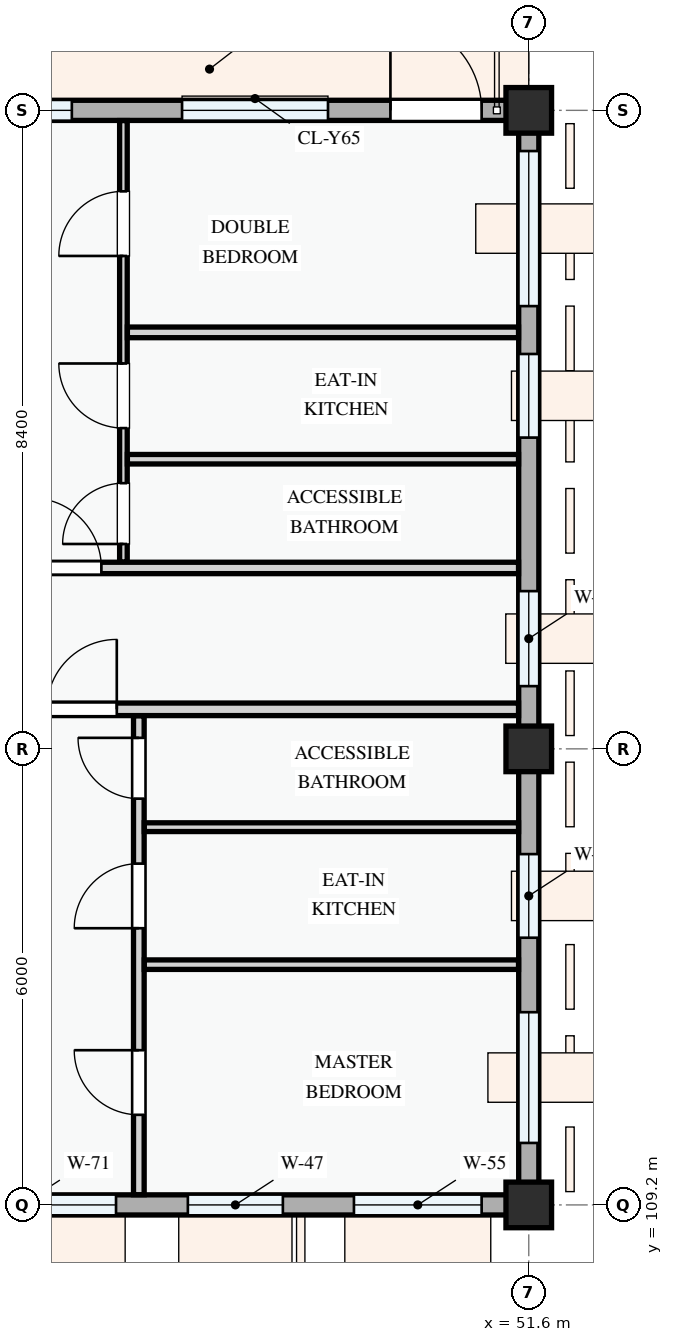
"""IFC4 building model, lengths in metres.
Left out: names, types, materials, properties, quantities, classifications, styles, units other than length and angle.
Written with IfcOpenShell. Run it as: python <this file> out.ifc"""

import sys

from ifc_helpers import new_model, si_unit, direction, frame, frame_2d, origin, origin_2d, place, context, subcontext, project, spatial, rectangle, extrude, element, fill, save


model = new_model("IFC4")
c1 = context("Model", 3, precision=1e-05, world=origin(), true_north=direction((0.0, 1.0)))
c2 = subcontext(c1, "Body", "Model", "MODEL_VIEW")
j1 = project(units=[si_unit("LENGTHUNIT", "METRE"), si_unit("PLANEANGLEUNIT", "RADIAN")], contexts=[c1])
p1 = place(None, origin())
s1 = spatial("IfcSite", under=j1, at=p1, CompositionType="ELEMENT")
p2 = place(p1, origin())
s2 = spatial("IfcBuilding", under=s1, at=p2, CompositionType="ELEMENT")
p3 = place(p2, frame((0.0, 0.0, 34.5)))
s3 = spatial("IfcBuildingStorey", under=s2, at=p3, CompositionType="ELEMENT", Elevation=34.5)
for number, where, z_axis, x_axis in (
    (1, (51.6, 109.2, 0.0), (0.0, 0.0, 1.0), (1.0, 0.0, 0.0)),
    (2, (51.6, 115.2, 0.0), (0.0, 0.0, 1.0), (1.0, 0.0, 0.0)),
    (3, (51.6, 123.6, 0.0), (0.0, 0.0, 1.0), (1.0, 0.0, 0.0)),
):
    element("IfcColumn", number, at=place(p3, frame(where, z_axis=z_axis, x_axis=x_axis)), inside=s3, PredefinedType="COLUMN", context=c2, shape_type="SweptSolid", body=[
        extrude(rectangle(XDim=0.6, YDim=0.6, at=origin_2d()), origin(), (0.0, 0.0, 1.0), 3.3),
    ])
p4 = place(p3, frame((43.2, 109.2, 0.0), z_axis=(0.0, 0.0, 1.0), x_axis=(1.0, 0.0, 0.0)))
e4 = element("IfcWall", 4, at=p4, inside=s3, PredefinedType="STANDARD", context=c2, shape_type="SweptSolid", body=[
    extrude(rectangle(XDim=8.4, YDim=0.265, at=frame_2d((4.2, 0.0))), origin(), (0.0, 0.0, 1.0), 2.375),
])
p5 = place(p4, frame((0.49, 0.0, 0.78)))
e5 = element("IfcOpeningElement", 5, at=p5, cuts=e4, PredefinedType="OPENING", context=c2, shape_type="SweptSolid", body=[
    extrude(rectangle(XDim=2.48, YDim=1.46, at=frame_2d((1.24, 0.73))), frame((0.0, 0.143, 0.0), z_axis=(0.0, -1.0, 0.0), x_axis=(1.0, 0.0, 0.0)), (0.0, 0.0, 1.0), 0.285),
])
p6 = place(p4, frame((3.915, 0.0, 0.78)))
e6 = element("IfcOpeningElement", 6, at=p6, cuts=e4, PredefinedType="OPENING", context=c2, shape_type="SweptSolid", body=[
    extrude(rectangle(XDim=1.25, YDim=1.45, at=frame_2d((0.625, 0.725))), frame((0.0, 0.143, 0.0), z_axis=(0.0, -1.0, 0.0), x_axis=(1.0, 0.0, 0.0)), (0.0, 0.0, 1.0), 0.285),
])
p7 = place(p4, frame((6.1, 0.0, 0.78)))
e7 = element("IfcOpeningElement", 7, at=p7, cuts=e4, PredefinedType="OPENING", context=c2, shape_type="SweptSolid", body=[
    extrude(rectangle(XDim=1.68, YDim=1.46, at=frame_2d((0.84, 0.73))), frame((0.0, 0.143, 0.0), z_axis=(0.0, -1.0, 0.0), x_axis=(1.0, 0.0, 0.0)), (0.0, 0.0, 1.0), 0.285),
])
p8 = place(p3, frame((51.6, 109.2, 0.0), z_axis=(0.0, 0.0, 1.0), x_axis=(0.0, 1.0, 0.0)))
e8 = element("IfcWall", 8, at=p8, inside=s3, PredefinedType="STANDARD", context=c2, shape_type="SweptSolid", body=[
    extrude(rectangle(XDim=6.0, YDim=0.265, at=frame_2d((3.0, 0.0))), origin(), (0.0, 0.0, 1.0), 2.575),
])
p9 = place(p8, frame((0.815, 0.0, 0.78)))
e9 = element("IfcOpeningElement", 9, at=p9, cuts=e8, PredefinedType="OPENING", context=c2, shape_type="SweptSolid", body=[
    extrude(rectangle(XDim=1.72, YDim=1.52, at=frame_2d((0.86, 0.76))), frame((0.0, 0.143, 0.0), z_axis=(0.0, -1.0, 0.0), x_axis=(1.0, 0.0, 0.0)), (0.0, 0.0, 1.0), 0.285),
])
p10 = place(p8, frame((3.515, 0.0, 0.78)))
e10 = element("IfcOpeningElement", 10, at=p10, cuts=e8, PredefinedType="OPENING", context=c2, shape_type="SweptSolid", body=[
    extrude(rectangle(XDim=1.1, YDim=1.3, at=frame_2d((0.55, 0.65))), frame((0.0, 0.143, 0.0), z_axis=(0.0, -1.0, 0.0), x_axis=(1.0, 0.0, 0.0)), (0.0, 0.0, 1.0), 0.285),
])
p11 = place(p3, frame((51.6, 115.2, 0.0), z_axis=(0.0, 0.0, 1.0), x_axis=(0.0, 1.0, 0.0)))
e11 = element("IfcWall", 11, at=p11, inside=s3, PredefinedType="STANDARD", context=c2, shape_type="SweptSolid", body=[
    extrude(rectangle(XDim=8.4, YDim=0.265, at=frame_2d((4.2, 0.0))), origin(), (0.0, 0.0, 1.0), 2.425),
])
p12 = place(p11, frame((0.825, 0.0, 0.78)))
e12 = element("IfcOpeningElement", 12, at=p12, cuts=e11, PredefinedType="OPENING", context=c2, shape_type="SweptSolid", body=[
    extrude(rectangle(XDim=1.25, YDim=1.3, at=frame_2d((0.625, 0.65))), frame((0.0, 0.143, 0.0), z_axis=(0.0, -1.0, 0.0), x_axis=(1.0, 0.0, 0.0)), (0.0, 0.0, 1.0), 0.285),
])
p13 = place(p11, frame((4.095, 0.0, 0.78)))
e13 = element("IfcOpeningElement", 13, at=p13, cuts=e11, PredefinedType="OPENING", context=c2, shape_type="SweptSolid", body=[
    extrude(rectangle(XDim=1.1, YDim=1.3, at=frame_2d((0.55, 0.65))), frame((0.0, 0.143, 0.0), z_axis=(0.0, -1.0, 0.0), x_axis=(1.0, 0.0, 0.0)), (0.0, 0.0, 1.0), 0.285),
])
p14 = place(p11, frame((5.825, 0.0, 0.78)))
e14 = element("IfcOpeningElement", 14, at=p14, cuts=e11, PredefinedType="OPENING", context=c2, shape_type="SweptSolid", body=[
    extrude(rectangle(XDim=2.04, YDim=1.46, at=frame_2d((1.02, 0.73))), frame((0.0, 0.143, 0.0), z_axis=(0.0, -1.0, 0.0), x_axis=(1.0, 0.0, 0.0)), (0.0, 0.0, 1.0), 0.285),
])
p15 = place(p3, frame((51.6, 123.6, 0.0), z_axis=(0.0, 0.0, 1.0), x_axis=(-1.0, 0.0, 0.0)))
e15 = element("IfcWall", 15, at=p15, inside=s3, PredefinedType="STANDARD", context=c2, shape_type="SweptSolid", body=[
    extrude(rectangle(XDim=8.4, YDim=0.265, at=frame_2d((4.2, 0.0))), origin(), (0.0, 0.0, 1.0), 2.345),
])
p16 = place(p15, frame((0.62, 0.0, 0.0)))
e16 = element("IfcOpeningElement", 16, at=p16, cuts=e15, PredefinedType="OPENING", context=c2, shape_type="SweptSolid", body=[
    extrude(rectangle(XDim=1.2, YDim=2.15, at=frame_2d((0.6, 1.075))), frame((0.0, 0.143, 0.0), z_axis=(0.0, -1.0, 0.0), x_axis=(1.0, 0.0, 0.0)), (0.0, 0.0, 1.0), 0.285),
])
p17 = place(p15, frame((2.641, 0.0, 0.78)))
e17 = element("IfcOpeningElement", 17, at=p17, cuts=e15, PredefinedType="OPENING", context=c2, shape_type="SweptSolid", body=[
    extrude(rectangle(XDim=1.92, YDim=1.44, at=frame_2d((0.96, 0.72))), frame((0.0, 0.143, 0.0), z_axis=(0.0, -1.0, 0.0), x_axis=(1.0, 0.0, 0.0)), (0.0, 0.0, 1.0), 0.285),
])
p18 = place(p15, frame((6.011, 0.0, 0.78)))
e18 = element("IfcOpeningElement", 18, at=p18, cuts=e15, PredefinedType="OPENING", context=c2, shape_type="SweptSolid", body=[
    extrude(rectangle(XDim=1.52, YDim=1.42, at=frame_2d((0.76, 0.71))), frame((0.0, 0.143, 0.0), z_axis=(0.0, -1.0, 0.0), x_axis=(1.0, 0.0, 0.0)), (0.0, 0.0, 1.0), 0.285),
])
p19 = place(p3, frame((46.47, 109.334, 0.0), z_axis=(0.0, 0.0, 1.0), x_axis=(0.0, 1.0, 0.0)))
e19 = element("IfcWall", 19, at=p19, inside=s3, PredefinedType="PARTITIONING", context=c2, shape_type="SweptSolid", body=[
    extrude(rectangle(XDim=6.301, YDim=0.14, at=frame_2d((3.15, 0.0))), origin(), (0.0, 0.0, 1.0), 3.0),
])
p20 = place(p19, frame((1.051, 0.0, 0.0)))
e20 = element("IfcOpeningElement", 20, at=p20, cuts=e19, PredefinedType="OPENING", context=c2, shape_type="SweptSolid", body=[
    extrude(rectangle(XDim=0.85, YDim=2.1, at=frame_2d((0.425, 1.05))), frame((0.0, 0.08, 0.0), z_axis=(0.0, -1.0, 0.0), x_axis=(1.0, 0.0, 0.0)), (0.0, 0.0, 1.0), 0.16),
])
p21 = place(p19, frame((3.506, 0.0, 0.0)))
e21 = element("IfcOpeningElement", 21, at=p21, cuts=e19, PredefinedType="OPENING", context=c2, shape_type="SweptSolid", body=[
    extrude(rectangle(XDim=0.85, YDim=2.1, at=frame_2d((0.425, 1.05))), frame((0.0, 0.08, 0.0), z_axis=(0.0, -1.0, 0.0), x_axis=(1.0, 0.0, 0.0)), (0.0, 0.0, 1.0), 0.16),
])
p22 = place(p19, frame((5.21, 0.0, 0.0)))
e22 = element("IfcOpeningElement", 22, at=p22, cuts=e19, PredefinedType="OPENING", context=c2, shape_type="SweptSolid", body=[
    extrude(rectangle(XDim=0.8, YDim=2.1, at=frame_2d((0.4, 1.05))), frame((0.0, 0.08, 0.0), z_axis=(0.0, -1.0, 0.0), x_axis=(1.0, 0.0, 0.0)), (0.0, 0.0, 1.0), 0.16),
])
p23 = place(p3, frame((46.542, 112.361, 0.0), z_axis=(0.0, 0.0, 1.0), x_axis=(1.0, 0.0, 0.0)))
e23 = element("IfcWall", 23, at=p23, inside=s3, PredefinedType="PARTITIONING", context=c2, shape_type="SweptSolid", body=[
    extrude(rectangle(XDim=4.924, YDim=0.125, at=frame_2d((2.462, 0.0))), origin(), (0.0, 0.0, 1.0), 3.0),
])
p24 = place(p3, frame((46.542, 114.17, 0.0), z_axis=(0.0, 0.0, 1.0), x_axis=(1.0, 0.0, 0.0)))
e24 = element("IfcWall", 24, at=p24, inside=s3, PredefinedType="PARTITIONING", context=c2, shape_type="SweptSolid", body=[
    extrude(rectangle(XDim=4.924, YDim=0.115, at=frame_2d((2.462, 0.0))), origin(), (0.0, 0.0, 1.0), 3.0),
])
p25 = place(p3, frame((46.267, 117.657, 0.0), z_axis=(0.0, 0.0, 1.0), x_axis=(0.0, 1.0, 0.0)))
e25 = element("IfcWall", 25, at=p25, inside=s3, PredefinedType="PARTITIONING", context=c2, shape_type="SweptSolid", body=[
    extrude(rectangle(XDim=5.809, YDim=0.1, at=frame_2d((2.904, 0.0))), origin(), (0.0, 0.0, 1.0), 3.0),
])
p26 = place(p25, frame((0.238, 0.0, 0.0)))
e26 = element("IfcOpeningElement", 26, at=p26, cuts=e25, PredefinedType="OPENING", context=c2, shape_type="SweptSolid", body=[
    extrude(rectangle(XDim=0.8, YDim=2.1, at=frame_2d((0.4, 1.05))), frame((0.0, 0.06, 0.0), z_axis=(0.0, -1.0, 0.0), x_axis=(1.0, 0.0, 0.0)), (0.0, 0.0, 1.0), 0.12),
])
p27 = place(p25, frame((1.763, 0.0, 0.0)))
e27 = element("IfcOpeningElement", 27, at=p27, cuts=e25, PredefinedType="OPENING", context=c2, shape_type="SweptSolid", body=[
    extrude(rectangle(XDim=0.85, YDim=2.1, at=frame_2d((0.425, 1.05))), frame((0.0, 0.06, 0.0), z_axis=(0.0, -1.0, 0.0), x_axis=(1.0, 0.0, 0.0)), (0.0, 0.0, 1.0), 0.12),
])
p28 = place(p25, frame((4.028, 0.0, 0.0)))
e28 = element("IfcOpeningElement", 28, at=p28, cuts=e25, PredefinedType="OPENING", context=c2, shape_type="SweptSolid", body=[
    extrude(rectangle(XDim=0.85, YDim=2.1, at=frame_2d((0.425, 1.05))), frame((0.0, 0.06, 0.0), z_axis=(0.0, -1.0, 0.0), x_axis=(1.0, 0.0, 0.0)), (0.0, 0.0, 1.0), 0.12),
])
p29 = place(p3, frame((46.319, 120.679, 0.0), z_axis=(0.0, 0.0, 1.0), x_axis=(1.0, 0.0, 0.0)))
e29 = element("IfcWall", 29, at=p29, inside=s3, PredefinedType="PARTITIONING", context=c2, shape_type="SweptSolid", body=[
    extrude(rectangle(XDim=5.146, YDim=0.14, at=frame_2d((2.573, 0.0))), origin(), (0.0, 0.0, 1.0), 3.0),
])
p30 = place(p3, frame((46.319, 119.01, 0.0), z_axis=(0.0, 0.0, 1.0), x_axis=(1.0, 0.0, 0.0)))
e30 = element("IfcWall", 30, at=p30, inside=s3, PredefinedType="PARTITIONING", context=c2, shape_type="SweptSolid", body=[
    extrude(rectangle(XDim=5.146, YDim=0.125, at=frame_2d((2.573, 0.0))), origin(), (0.0, 0.0, 1.0), 3.0),
])
p31 = place(p3, frame((25.15, 115.72, 0.0), z_axis=(0.0, 0.0, 1.0), x_axis=(1.0, 0.0, 0.0)))
e31 = element("IfcWall", 31, at=p31, inside=s3, PredefinedType="PARTITIONING", context=c2, shape_type="SweptSolid", body=[
    extrude(rectangle(XDim=26.316, YDim=0.165, at=frame_2d((13.158, 0.0))), origin(), (0.0, 0.0, 1.0), 3.0),
])
p32 = place(p31, frame((0.25, 0.0, 0.0)))
e32 = element("IfcOpeningElement", 32, at=p32, cuts=e31, PredefinedType="OPENING", context=c2, shape_type="SweptSolid", body=[
    extrude(rectangle(XDim=0.92, YDim=2.1, at=frame_2d((0.46, 1.05))), frame((0.0, 0.093, 0.0), z_axis=(0.0, -1.0, 0.0), x_axis=(1.0, 0.0, 0.0)), (0.0, 0.0, 1.0), 0.185),
])
p33 = place(p31, frame((9.22, 0.0, 0.0)))
e33 = element("IfcOpeningElement", 33, at=p33, cuts=e31, PredefinedType="OPENING", context=c2, shape_type="SweptSolid", body=[
    extrude(rectangle(XDim=0.92, YDim=2.1, at=frame_2d((0.46, 1.05))), frame((0.0, 0.093, 0.0), z_axis=(0.0, -1.0, 0.0), x_axis=(1.0, 0.0, 0.0)), (0.0, 0.0, 1.0), 0.185),
])
p34 = place(p31, frame((20.11, 0.0, 0.0)))
e34 = element("IfcOpeningElement", 34, at=p34, cuts=e31, PredefinedType="OPENING", context=c2, shape_type="SweptSolid", body=[
    extrude(rectangle(XDim=0.92, YDim=2.1, at=frame_2d((0.46, 1.05))), frame((0.0, 0.093, 0.0), z_axis=(0.0, -1.0, 0.0), x_axis=(1.0, 0.0, 0.0)), (0.0, 0.0, 1.0), 0.185),
])
p35 = place(p3, frame((22.66, 117.58, 0.0), z_axis=(0.0, 0.0, 1.0), x_axis=(1.0, 0.0, 0.0)))
e35 = element("IfcWall", 35, at=p35, inside=s3, PredefinedType="PARTITIONING", context=c2, shape_type="SweptSolid", body=[
    extrude(rectangle(XDim=28.806, YDim=0.15, at=frame_2d((14.403, 0.0))), origin(), (0.0, 0.0, 1.0), 3.0),
])
p36 = place(p35, frame((2.74, 0.0, 0.0)))
e36 = element("IfcOpeningElement", 36, at=p36, cuts=e35, PredefinedType="OPENING", context=c2, shape_type="SweptSolid", body=[
    extrude(rectangle(XDim=0.92, YDim=2.1, at=frame_2d((0.46, 1.05))), frame((0.0, 0.085, 0.0), z_axis=(0.0, -1.0, 0.0), x_axis=(1.0, 0.0, 0.0)), (0.0, 0.0, 1.0), 0.17),
])
p37 = place(p35, frame((11.71, 0.0, 0.0)))
e37 = element("IfcOpeningElement", 37, at=p37, cuts=e35, PredefinedType="OPENING", context=c2, shape_type="SweptSolid", body=[
    extrude(rectangle(XDim=0.96, YDim=2.12, at=frame_2d((0.48, 1.06))), frame((0.0, 0.085, 0.0), z_axis=(0.0, -1.0, 0.0), x_axis=(1.0, 0.0, 0.0)), (0.0, 0.0, 1.0), 0.17),
])
p38 = place(p35, frame((22.397, 0.0, 0.0)))
e38 = element("IfcOpeningElement", 38, at=p38, cuts=e35, PredefinedType="OPENING", context=c2, shape_type="SweptSolid", body=[
    extrude(rectangle(XDim=0.92, YDim=2.1, at=frame_2d((0.46, 1.05))), frame((0.0, 0.085, 0.0), z_axis=(0.0, -1.0, 0.0), x_axis=(1.0, 0.0, 0.0)), (0.0, 0.0, 1.0), 0.17),
])
p39 = place(p5, origin())
e39 = element("IfcWindow", 39, at=p39, inside=s3, PartitioningType="DOUBLE_PANEL_VERTICAL", PredefinedType="WINDOW", context=c2, shape_type="SweptSolid", body=[
    extrude(rectangle(XDim=2.48, YDim=1.46, at=frame_2d((1.24, 0.73))), frame((0.0, 0.03, 0.0), z_axis=(0.0, -1.0, 0.0), x_axis=(1.0, 0.0, 0.0)), (0.0, 0.0, 1.0), 0.06),
])
fill(e5, e39)
p40 = place(p6, origin())
e40 = element("IfcWindow", 40, at=p40, inside=s3, PartitioningType="SINGLE_PANEL", PredefinedType="WINDOW", context=c2, shape_type="SweptSolid", body=[
    extrude(rectangle(XDim=1.25, YDim=1.45, at=frame_2d((0.625, 0.725))), frame((0.0, 0.03, 0.0), z_axis=(0.0, -1.0, 0.0), x_axis=(1.0, 0.0, 0.0)), (0.0, 0.0, 1.0), 0.06),
])
fill(e6, e40)
p41 = place(p7, origin())
e41 = element("IfcWindow", 41, at=p41, inside=s3, PartitioningType="DOUBLE_PANEL_VERTICAL", PredefinedType="WINDOW", context=c2, shape_type="SweptSolid", body=[
    extrude(rectangle(XDim=1.68, YDim=1.46, at=frame_2d((0.84, 0.73))), frame((0.0, 0.03, 0.0), z_axis=(0.0, -1.0, 0.0), x_axis=(1.0, 0.0, 0.0)), (0.0, 0.0, 1.0), 0.06),
])
fill(e7, e41)
p42 = place(p9, origin())
e42 = element("IfcWindow", 42, at=p42, inside=s3, PartitioningType="DOUBLE_PANEL_VERTICAL", PredefinedType="WINDOW", context=c2, shape_type="SweptSolid", body=[
    extrude(rectangle(XDim=1.72, YDim=1.52, at=frame_2d((0.86, 0.76))), frame((0.0, 0.03, 0.0), z_axis=(0.0, -1.0, 0.0), x_axis=(1.0, 0.0, 0.0)), (0.0, 0.0, 1.0), 0.06),
])
fill(e9, e42)
p43 = place(p10, origin())
e43 = element("IfcWindow", 43, at=p43, inside=s3, PartitioningType="SINGLE_PANEL", PredefinedType="WINDOW", context=c2, shape_type="SweptSolid", body=[
    extrude(rectangle(XDim=1.1, YDim=1.3, at=frame_2d((0.55, 0.65))), frame((0.0, 0.03, 0.0), z_axis=(0.0, -1.0, 0.0), x_axis=(1.0, 0.0, 0.0)), (0.0, 0.0, 1.0), 0.06),
])
fill(e10, e43)
p44 = place(p12, origin())
e44 = element("IfcWindow", 44, at=p44, inside=s3, PartitioningType="SINGLE_PANEL", PredefinedType="WINDOW", context=c2, shape_type="SweptSolid", body=[
    extrude(rectangle(XDim=1.25, YDim=1.3, at=frame_2d((0.625, 0.65))), frame((0.0, 0.03, 0.0), z_axis=(0.0, -1.0, 0.0), x_axis=(1.0, 0.0, 0.0)), (0.0, 0.0, 1.0), 0.06),
])
fill(e12, e44)
p45 = place(p13, origin())
e45 = element("IfcWindow", 45, at=p45, inside=s3, PartitioningType="SINGLE_PANEL", PredefinedType="WINDOW", context=c2, shape_type="SweptSolid", body=[
    extrude(rectangle(XDim=1.1, YDim=1.3, at=frame_2d((0.55, 0.65))), frame((0.0, 0.03, 0.0), z_axis=(0.0, -1.0, 0.0), x_axis=(1.0, 0.0, 0.0)), (0.0, 0.0, 1.0), 0.06),
])
fill(e13, e45)
p46 = place(p14, origin())
e46 = element("IfcWindow", 46, at=p46, inside=s3, PartitioningType="DOUBLE_PANEL_VERTICAL", PredefinedType="WINDOW", context=c2, shape_type="SweptSolid", body=[
    extrude(rectangle(XDim=2.04, YDim=1.46, at=frame_2d((1.02, 0.73))), frame((0.0, 0.03, 0.0), z_axis=(0.0, -1.0, 0.0), x_axis=(1.0, 0.0, 0.0)), (0.0, 0.0, 1.0), 0.06),
])
fill(e14, e46)
p47 = place(p16, frame((1.2, 0.0, 0.0), z_axis=(0.0, 0.0, 1.0), x_axis=(-1.0, 0.0, 0.0)))
e47 = element("IfcDoor", 47, at=p47, inside=s3, OperationType="SINGLE_SWING_LEFT", PredefinedType="DOOR", context=c2, shape_type="SweptSolid", body=[
    extrude(rectangle(XDim=1.2, YDim=2.15, at=frame_2d((0.6, 1.075))), frame((0.0, 0.025, 0.0), z_axis=(0.0, -1.0, 0.0), x_axis=(1.0, 0.0, 0.0)), (0.0, 0.0, 1.0), 0.05),
])
fill(e16, e47)
p48 = place(p17, origin())
e48 = element("IfcWindow", 48, at=p48, inside=s3, PartitioningType="DOUBLE_PANEL_VERTICAL", PredefinedType="WINDOW", context=c2, shape_type="SweptSolid", body=[
    extrude(rectangle(XDim=1.92, YDim=1.44, at=frame_2d((0.96, 0.72))), frame((0.0, 0.03, 0.0), z_axis=(0.0, -1.0, 0.0), x_axis=(1.0, 0.0, 0.0)), (0.0, 0.0, 1.0), 0.06),
])
fill(e17, e48)
p49 = place(p18, origin())
e49 = element("IfcWindow", 49, at=p49, inside=s3, PartitioningType="SINGLE_PANEL", PredefinedType="WINDOW", context=c2, shape_type="SweptSolid", body=[
    extrude(rectangle(XDim=1.52, YDim=1.42, at=frame_2d((0.76, 0.71))), frame((0.0, 0.03, 0.0), z_axis=(0.0, -1.0, 0.0), x_axis=(1.0, 0.0, 0.0)), (0.0, 0.0, 1.0), 0.06),
])
fill(e18, e49)
p50 = place(p20, origin())
e50 = element("IfcDoor", 50, at=p50, inside=s3, OperationType="SINGLE_SWING_RIGHT", PredefinedType="DOOR", context=c2, shape_type="SweptSolid", body=[
    extrude(rectangle(XDim=0.85, YDim=2.1, at=frame_2d((0.425, 1.05))), frame((0.0, 0.025, 0.0), z_axis=(0.0, -1.0, 0.0), x_axis=(1.0, 0.0, 0.0)), (0.0, 0.0, 1.0), 0.05),
])
fill(e20, e50)
p51 = place(p21, origin())
e51 = element("IfcDoor", 51, at=p51, inside=s3, OperationType="SINGLE_SWING_LEFT", PredefinedType="DOOR", context=c2, shape_type="SweptSolid", body=[
    extrude(rectangle(XDim=0.85, YDim=2.1, at=frame_2d((0.425, 1.05))), frame((0.0, 0.025, 0.0), z_axis=(0.0, -1.0, 0.0), x_axis=(1.0, 0.0, 0.0)), (0.0, 0.0, 1.0), 0.05),
])
fill(e21, e51)
p52 = place(p22, origin())
e52 = element("IfcDoor", 52, at=p52, inside=s3, OperationType="SINGLE_SWING_RIGHT", PredefinedType="DOOR", context=c2, shape_type="SweptSolid", body=[
    extrude(rectangle(XDim=0.8, YDim=2.1, at=frame_2d((0.4, 1.05))), frame((0.0, 0.025, 0.0), z_axis=(0.0, -1.0, 0.0), x_axis=(1.0, 0.0, 0.0)), (0.0, 0.0, 1.0), 0.05),
])
fill(e22, e52)
p53 = place(p26, origin())
e53 = element("IfcDoor", 53, at=p53, inside=s3, OperationType="SINGLE_SWING_LEFT", PredefinedType="DOOR", context=c2, shape_type="SweptSolid", body=[
    extrude(rectangle(XDim=0.8, YDim=2.1, at=frame_2d((0.4, 1.05))), frame((0.0, 0.025, 0.0), z_axis=(0.0, -1.0, 0.0), x_axis=(1.0, 0.0, 0.0)), (0.0, 0.0, 1.0), 0.05),
])
fill(e26, e53)
p54 = place(p27, origin())
e54 = element("IfcDoor", 54, at=p54, inside=s3, OperationType="SINGLE_SWING_RIGHT", PredefinedType="DOOR", context=c2, shape_type="SweptSolid", body=[
    extrude(rectangle(XDim=0.85, YDim=2.1, at=frame_2d((0.425, 1.05))), frame((0.0, 0.025, 0.0), z_axis=(0.0, -1.0, 0.0), x_axis=(1.0, 0.0, 0.0)), (0.0, 0.0, 1.0), 0.05),
])
fill(e27, e54)
p55 = place(p28, origin())
e55 = element("IfcDoor", 55, at=p55, inside=s3, OperationType="SINGLE_SWING_LEFT", PredefinedType="DOOR", context=c2, shape_type="SweptSolid", body=[
    extrude(rectangle(XDim=0.85, YDim=2.1, at=frame_2d((0.425, 1.05))), frame((0.0, 0.025, 0.0), z_axis=(0.0, -1.0, 0.0), x_axis=(1.0, 0.0, 0.0)), (0.0, 0.0, 1.0), 0.05),
])
fill(e28, e55)
p56 = place(p34, origin())
e56 = element("IfcDoor", 56, at=p56, inside=s3, OperationType="SINGLE_SWING_RIGHT", PredefinedType="DOOR", context=c2, shape_type="SweptSolid", body=[
    extrude(rectangle(XDim=0.92, YDim=2.1, at=frame_2d((0.46, 1.05))), frame((0.0, 0.025, 0.0), z_axis=(0.0, -1.0, 0.0), x_axis=(1.0, 0.0, 0.0)), (0.0, 0.0, 1.0), 0.05),
])
fill(e34, e56)
p57 = place(p38, origin())
e57 = element("IfcDoor", 57, at=p57, inside=s3, OperationType="SINGLE_SWING_LEFT", PredefinedType="DOOR", context=c2, shape_type="SweptSolid", body=[
    extrude(rectangle(XDim=0.92, YDim=2.1, at=frame_2d((0.46, 1.05))), frame((0.0, 0.025, 0.0), z_axis=(0.0, -1.0, 0.0), x_axis=(1.0, 0.0, 0.0)), (0.0, 0.0, 1.0), 0.05),
])
fill(e38, e57)
save(model, sys.argv[1])
